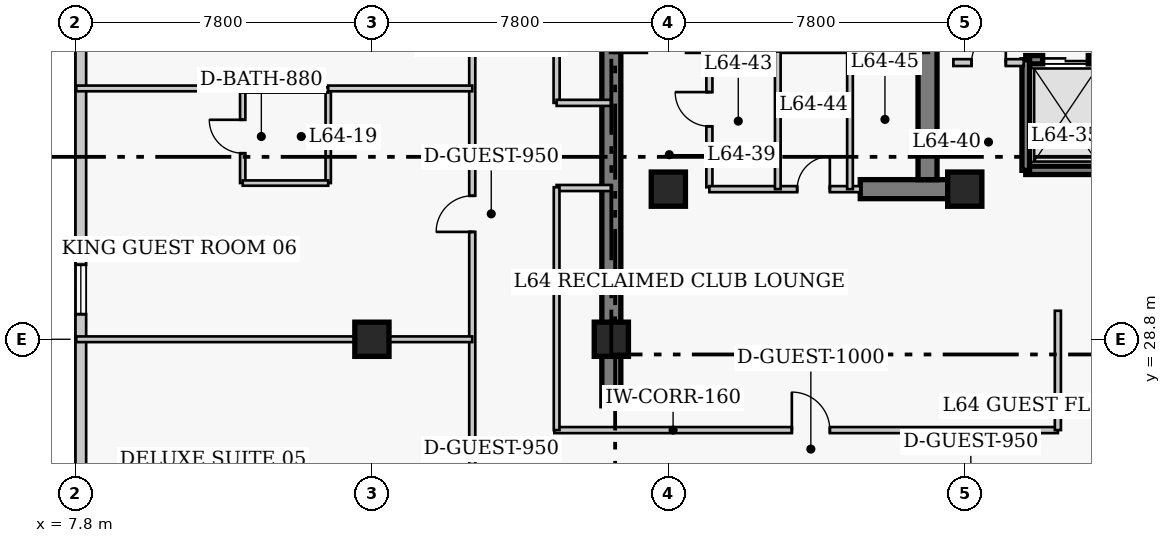
"""IFC4 building model, lengths in metres.
Left out: names, types, materials, properties, quantities, classifications, styles, units other than length and angle.
Written with IfcOpenShell. Run it as: python <this file> out.ifc"""

import sys

from ifc_helpers import new_model, si_unit, direction, frame, frame_2d, origin, origin_2d, place, context, subcontext, project, spatial, rectangle, extrude, element, fill, save


model = new_model("IFC4")
c1 = context("Model", 3, precision=1e-05, world=origin(), true_north=direction((0.0, 1.0)))
c2 = subcontext(c1, "Body", "Model", "MODEL_VIEW")
j1 = project(units=[si_unit("LENGTHUNIT", "METRE"), si_unit("PLANEANGLEUNIT", "RADIAN")], contexts=[c1])
p1 = place(None, origin())
s1 = spatial("IfcSite", under=j1, at=p1, CompositionType="ELEMENT")
p2 = place(p1, origin())
s2 = spatial("IfcBuilding", under=s1, at=p2, CompositionType="ELEMENT")
p3 = place(p2, frame((0.0, 0.0, 257.4)))
s3 = spatial("IfcBuildingStorey", under=s2, at=p3, CompositionType="ELEMENT", Elevation=257.4)
p4 = place(p3, frame((21.9, 27.05, 0.0), z_axis=(0.0, 0.0, 1.0), x_axis=(0.0, 1.0, 0.0)))
e1 = element("IfcWall", 1, at=p4, inside=s3, PredefinedType="SHEAR", context=c2, shape_type="SweptSolid", body=[
    extrude(rectangle(XDim=13.52, YDim=0.5, at=frame_2d((6.76, 0.0))), origin(), (0.0, 0.0, 1.0), 4.0),
])
p5 = place(p3, frame((28.45, 32.75, 0.0), z_axis=(0.0, 0.0, 1.0), x_axis=(1.0, 0.0, 0.0)))
e2 = element("IfcWall", 2, at=p5, inside=s3, PredefinedType="SHEAR", context=c2, shape_type="SweptSolid", body=[
    extrude(rectangle(XDim=2.4, YDim=0.5, at=frame_2d((1.2, 0.0))), origin(), (0.0, 0.0, 1.0), 4.0),
])
p6 = place(p3, frame((30.22, 33.0, 0.0), z_axis=(0.0, 0.0, 1.0), x_axis=(0.0, 1.0, 0.0)))
e3 = element("IfcWall", 3, at=p6, inside=s3, PredefinedType="SHEAR", context=c2, shape_type="SweptSolid", body=[
    extrude(rectangle(XDim=7.32, YDim=0.5, at=frame_2d((3.66, 0.0))), origin(), (0.0, 0.0, 1.0), 4.0),
])
for number, where, z_axis, x_axis in (
    (4, (15.6, 28.8, 0.0), (0.0, 0.0, 1.0), (1.0, 0.0, 0.0)),
    (5, (21.9, 28.8, 0.0), (0.0, 0.0, 1.0), (1.0, 0.0, 0.0)),
    (6, (23.4, 32.75, 0.0), (0.0, 0.0, 1.0), (1.0, 0.0, 0.0)),
    (7, (31.2, 32.75, 0.0), (0.0, 0.0, 1.0), (1.0, 0.0, 0.0)),
):
    element("IfcColumn", number, at=place(p3, frame(where, z_axis=z_axis, x_axis=x_axis)), inside=s3, PredefinedType="COLUMN", context=c2, shape_type="SweptSolid", body=[
        extrude(rectangle(XDim=0.9, YDim=0.9, at=origin_2d()), origin(), (0.0, 0.0, 1.0), 4.0),
    ])
p7 = place(p3, frame((7.94, 41.04, 0.0), z_axis=(0.0, 0.0, 1.0), x_axis=(0.0, -1.0, 0.0)))
e8 = element("IfcWall", 8, at=p7, inside=s3, PredefinedType="SOLIDWALL", context=c2, shape_type="SweptSolid", body=[
    extrude(rectangle(XDim=30.88, YDim=0.28, at=frame_2d((15.44, 0.0))), origin(), (0.0, 0.0, 1.0), 3.76),
])
p8 = place(p7, frame((3.21, 0.0, 0.85)))
e9 = element("IfcOpeningElement", 9, at=p8, cuts=e8, PredefinedType="OPENING", context=c2, shape_type="SweptSolid", body=[
    extrude(rectangle(XDim=1.3, YDim=1.7, at=frame_2d((0.65, 0.85))), frame((0.0, 0.15, 0.0), z_axis=(0.0, -1.0, 0.0), x_axis=(1.0, 0.0, 0.0)), (0.0, 0.0, 1.0), 0.3),
])
p9 = place(p7, frame((10.28, 0.0, 0.85)))
e10 = element("IfcOpeningElement", 10, at=p9, cuts=e8, PredefinedType="OPENING", context=c2, shape_type="SweptSolid", body=[
    extrude(rectangle(XDim=1.3, YDim=1.7, at=frame_2d((0.65, 0.85))), frame((0.0, 0.15, 0.0), z_axis=(0.0, -1.0, 0.0), x_axis=(1.0, 0.0, 0.0)), (0.0, 0.0, 1.0), 0.3),
])
p10 = place(p7, frame((18.65, 0.0, 0.85)))
e11 = element("IfcOpeningElement", 11, at=p10, cuts=e8, PredefinedType="OPENING", context=c2, shape_type="SweptSolid", body=[
    extrude(rectangle(XDim=1.3, YDim=1.7, at=frame_2d((0.65, 0.85))), frame((0.0, 0.15, 0.0), z_axis=(0.0, -1.0, 0.0), x_axis=(1.0, 0.0, 0.0)), (0.0, 0.0, 1.0), 0.3),
])
p11 = place(p7, frame((26.37, 0.0, 0.85)))
e12 = element("IfcOpeningElement", 12, at=p11, cuts=e8, PredefinedType="OPENING", context=c2, shape_type="SweptSolid", body=[
    extrude(rectangle(XDim=1.3, YDim=1.7, at=frame_2d((0.65, 0.85))), frame((0.0, 0.15, 0.0), z_axis=(0.0, -1.0, 0.0), x_axis=(1.0, 0.0, 0.0)), (0.0, 0.0, 1.0), 0.3),
])
p12 = place(p3, frame((32.805, 36.155, 0.0), z_axis=(0.0, 0.0, 1.0), x_axis=(1.0, 0.0, 0.0)))
e13 = element("IfcWall", 13, at=p12, inside=s3, PredefinedType="SHEAR", context=c2, shape_type="SweptSolid", body=[
    extrude(rectangle(XDim=2.09, YDim=0.22, at=frame_2d((1.045, 0.0))), origin(), (0.0, 0.0, 1.0), 4.0),
])
p13 = place(p12, frame((0.445, 0.0, 0.0)))
e14 = element("IfcOpeningElement", 14, at=p13, cuts=e13, PredefinedType="OPENING", context=c2, shape_type="SweptSolid", body=[
    extrude(rectangle(XDim=1.2, YDim=2.15, at=frame_2d((0.6, 1.075))), frame((0.0, 0.12, 0.0), z_axis=(0.0, -1.0, 0.0), x_axis=(1.0, 0.0, 0.0)), (0.0, 0.0, 1.0), 0.24),
])
p14 = place(p3, frame((32.805, 33.245, 0.0), z_axis=(0.0, 0.0, 1.0), x_axis=(1.0, 0.0, 0.0)))
e15 = element("IfcWall", 15, at=p14, inside=s3, PredefinedType="SHEAR", context=c2, shape_type="SweptSolid", body=[
    extrude(rectangle(XDim=2.09, YDim=0.22, at=frame_2d((1.045, 0.0))), origin(), (0.0, 0.0, 1.0), 4.0),
])
p15 = place(p3, frame((32.805, 33.245, 0.0), z_axis=(0.0, 0.0, 1.0), x_axis=(0.0, 1.0, 0.0)))
e16 = element("IfcWall", 16, at=p15, inside=s3, PredefinedType="SHEAR", context=c2, shape_type="SweptSolid", body=[
    extrude(rectangle(XDim=2.91, YDim=0.2, at=frame_2d((1.455, 0.0))), origin(), (0.0, 0.0, 1.0), 4.0),
])
p16 = place(p3, frame((30.9, 36.08, 0.0), z_axis=(0.0, 0.0, 1.0), x_axis=(1.0, 0.0, 0.0)))
e17 = element("IfcWall", 17, at=p16, inside=s3, PredefinedType="PARTITIONING", context=c2, shape_type="SweptSolid", body=[
    extrude(rectangle(XDim=1.85, YDim=0.18, at=frame_2d((0.925, 0.0))), origin(), (0.0, 0.0, 1.0), 3.76),
])
p17 = place(p16, frame((0.48, 0.0, 0.0)))
e18 = element("IfcOpeningElement", 18, at=p17, cuts=e17, PredefinedType="OPENING", context=c2, shape_type="SweptSolid", body=[
    extrude(rectangle(XDim=0.9, YDim=2.15, at=frame_2d((0.45, 1.075))), frame((0.0, 0.1, 0.0), z_axis=(0.0, -1.0, 0.0), x_axis=(1.0, 0.0, 0.0)), (0.0, 0.0, 1.0), 0.2),
])
p18 = place(p3, frame((24.48, 32.8, 0.0), z_axis=(0.0, 0.0, 1.0), x_axis=(0.0, 1.0, 0.0)))
e19 = element("IfcWall", 19, at=p18, inside=s3, PredefinedType="PARTITIONING", context=c2, shape_type="SweptSolid", body=[
    extrude(rectangle(XDim=3.57, YDim=0.16, at=frame_2d((1.785, 0.0))), origin(), (0.0, 0.0, 1.0), 3.76),
])
p19 = place(p18, frame((1.604, 0.0, 0.0)))
e20 = element("IfcOpeningElement", 20, at=p19, cuts=e19, PredefinedType="OPENING", context=c2, shape_type="SweptSolid", body=[
    extrude(rectangle(XDim=0.9, YDim=2.1, at=frame_2d((0.45, 1.05))), frame((0.0, 0.09, 0.0), z_axis=(0.0, -1.0, 0.0), x_axis=(1.0, 0.0, 0.0)), (0.0, 0.0, 1.0), 0.18),
])
p20 = place(p3, frame((24.48, 32.75, 0.0), z_axis=(0.0, 0.0, 1.0), x_axis=(1.0, 0.0, 0.0)))
e21 = element("IfcWall", 21, at=p20, inside=s3, PredefinedType="PARTITIONING", context=c2, shape_type="SweptSolid", body=[
    extrude(rectangle(XDim=3.97, YDim=0.16, at=frame_2d((1.985, 0.0))), origin(), (0.0, 0.0, 1.0), 3.76),
])
p21 = place(p20, frame((2.31, 0.0, 0.0)))
e22 = element("IfcOpeningElement", 22, at=p21, cuts=e21, PredefinedType="OPENING", context=c2, shape_type="SweptSolid", body=[
    extrude(rectangle(XDim=0.86, YDim=2.05, at=frame_2d((0.43, 1.025))), frame((0.0, 0.09, 0.0), z_axis=(0.0, -1.0, 0.0), x_axis=(1.0, 0.0, 0.0)), (0.0, 0.0, 1.0), 0.18),
])
for number, where, z_axis, x_axis in (
    (23, (26.28, 32.75, 0.0), (0.0, 0.0, 1.0), (0.0, 1.0, 0.0)),
    (24, (28.18, 32.75, 0.0), (0.0, 0.0, 1.0), (0.0, 1.0, 0.0)),
):
    element("IfcWall", number, at=place(p3, frame(where, z_axis=z_axis, x_axis=x_axis)), inside=s3, PredefinedType="PARTITIONING", context=c2, shape_type="SweptSolid", body=[
        extrude(rectangle(XDim=3.62, YDim=0.15, at=frame_2d((1.81, 0.0))), origin(), (0.0, 0.0, 1.0), 3.76),
    ])
p22 = place(p3, frame((20.4, 26.41, 0.0), z_axis=(0.0, 0.0, 1.0), x_axis=(1.0, 0.0, 0.0)))
e25 = element("IfcWall", 25, at=p22, inside=s3, PredefinedType="PARTITIONING", context=c2, shape_type="SweptSolid", body=[
    extrude(rectangle(XDim=13.25, YDim=0.16, at=frame_2d((6.625, 0.0))), origin(), (0.0, 0.0, 1.0), 3.76),
])
p23 = place(p22, frame((6.25, 0.0, 0.0)))
e26 = element("IfcOpeningElement", 26, at=p23, cuts=e25, PredefinedType="OPENING", context=c2, shape_type="SweptSolid", body=[
    extrude(rectangle(XDim=1.0, YDim=2.15, at=frame_2d((0.5, 1.075))), frame((0.0, 0.09, 0.0), z_axis=(0.0, -1.0, 0.0), x_axis=(1.0, 0.0, 0.0)), (0.0, 0.0, 1.0), 0.18),
])
p24 = place(p3, frame((33.65, 26.41, 0.0), z_axis=(0.0, 0.0, 1.0), x_axis=(0.0, 1.0, 0.0)))
e27 = element("IfcWall", 27, at=p24, inside=s3, PredefinedType="PARTITIONING", context=c2, shape_type="SweptSolid", body=[
    extrude(rectangle(XDim=3.14, YDim=0.16, at=frame_2d((1.57, 0.0))), origin(), (0.0, 0.0, 1.0), 3.76),
])
p25 = place(p3, frame((18.24, 8.55, 0.0), z_axis=(0.0, 0.0, 1.0), x_axis=(0.0, 1.0, 0.0)))
e28 = element("IfcWall", 28, at=p25, inside=s3, PredefinedType="PARTITIONING", context=c2, shape_type="SweptSolid", body=[
    extrude(rectangle(XDim=32.1, YDim=0.16, at=frame_2d((16.05, 0.0))), origin(), (0.0, 0.0, 1.0), 3.76),
])
p26 = place(p25, frame((5.25, 0.0, 0.0)))
e29 = element("IfcOpeningElement", 29, at=p26, cuts=e28, PredefinedType="OPENING", context=c2, shape_type="SweptSolid", body=[
    extrude(rectangle(XDim=0.95, YDim=2.1, at=frame_2d((0.475, 1.05))), frame((0.0, 0.09, 0.0), z_axis=(0.0, -1.0, 0.0), x_axis=(1.0, 0.0, 0.0)), (0.0, 0.0, 1.0), 0.18),
])
p27 = place(p25, frame((15.375, 0.0, 0.0)))
e30 = element("IfcOpeningElement", 30, at=p27, cuts=e28, PredefinedType="OPENING", context=c2, shape_type="SweptSolid", body=[
    extrude(rectangle(XDim=0.95, YDim=2.1, at=frame_2d((0.475, 1.05))), frame((0.0, 0.09, 0.0), z_axis=(0.0, -1.0, 0.0), x_axis=(1.0, 0.0, 0.0)), (0.0, 0.0, 1.0), 0.18),
])
p28 = place(p25, frame((23.075, 0.0, 0.0)))
e31 = element("IfcOpeningElement", 31, at=p28, cuts=e28, PredefinedType="OPENING", context=c2, shape_type="SweptSolid", body=[
    extrude(rectangle(XDim=0.95, YDim=2.1, at=frame_2d((0.475, 1.05))), frame((0.0, 0.09, 0.0), z_axis=(0.0, -1.0, 0.0), x_axis=(1.0, 0.0, 0.0)), (0.0, 0.0, 1.0), 0.18),
])
p29 = place(p25, frame((29.03, 0.0, 0.0)))
e32 = element("IfcOpeningElement", 32, at=p29, cuts=e28, PredefinedType="OPENING", context=c2, shape_type="SweptSolid", body=[
    extrude(rectangle(XDim=1.0, YDim=2.15, at=frame_2d((0.5, 1.075))), frame((0.0, 0.09, 0.0), z_axis=(0.0, -1.0, 0.0), x_axis=(1.0, 0.0, 0.0)), (0.0, 0.0, 1.0), 0.18),
])
p30 = place(p3, frame((20.46, 35.02, 0.0), z_axis=(0.0, 0.0, 1.0), x_axis=(0.0, 1.0, 0.0)))
e33 = element("IfcWall", 33, at=p30, inside=s3, PredefinedType="PARTITIONING", context=c2, shape_type="SweptSolid", body=[
    extrude(rectangle(XDim=5.63, YDim=0.16, at=frame_2d((2.815, 0.0))), origin(), (0.0, 0.0, 1.0), 3.76),
])
for number, where, z_axis, x_axis in (
    (34, (20.46, 35.02, 0.0), (0.0, 0.0, 1.0), (1.0, 0.0, 0.0)),
    (35, (20.46, 32.78, 0.0), (0.0, 0.0, 1.0), (1.0, 0.0, 0.0)),
):
    element("IfcWall", number, at=place(p3, frame(where, z_axis=z_axis, x_axis=x_axis)), inside=s3, PredefinedType="PARTITIONING", context=c2, shape_type="SweptSolid", body=[
        extrude(rectangle(XDim=1.44, YDim=0.16, at=frame_2d((0.72, 0.0))), origin(), (0.0, 0.0, 1.0), 3.76),
    ])
p31 = place(p3, frame((20.46, 26.41, 0.0), z_axis=(0.0, 0.0, 1.0), x_axis=(0.0, 1.0, 0.0)))
e36 = element("IfcWall", 36, at=p31, inside=s3, PredefinedType="PARTITIONING", context=c2, shape_type="SweptSolid", body=[
    extrude(rectangle(XDim=6.39, YDim=0.15, at=frame_2d((3.195, 0.0))), origin(), (0.0, 0.0, 1.0), 3.76),
])
p32 = place(p3, frame((7.82, 28.8, 0.0), z_axis=(0.0, 0.0, 1.0), x_axis=(1.0, 0.0, 0.0)))
e37 = element("IfcWall", 37, at=p32, inside=s3, PredefinedType="PARTITIONING", context=c2, shape_type="SweptSolid", body=[
    extrude(rectangle(XDim=10.42, YDim=0.15, at=frame_2d((5.21, 0.0))), origin(), (0.0, 0.0, 1.0), 3.064),
])
p33 = place(p3, frame((12.2, 32.91, 0.0), z_axis=(0.0, 0.0, 1.0), x_axis=(0.0, 1.0, 0.0)))
e38 = element("IfcWall", 38, at=p33, inside=s3, PredefinedType="PLUMBINGWALL", context=c2, shape_type="SweptSolid", body=[
    extrude(rectangle(XDim=2.45, YDim=0.14, at=frame_2d((1.225, 0.0))), origin(), (0.0, 0.0, 1.0), 3.76),
])
p34 = place(p33, frame((0.785, 0.0, 0.0)))
e39 = element("IfcOpeningElement", 39, at=p34, cuts=e38, PredefinedType="OPENING", context=c2, shape_type="SweptSolid", body=[
    extrude(rectangle(XDim=0.88, YDim=2.05, at=frame_2d((0.44, 1.025))), frame((0.0, 0.08, 0.0), z_axis=(0.0, -1.0, 0.0), x_axis=(1.0, 0.0, 0.0)), (0.0, 0.0, 1.0), 0.16),
])
p35 = place(p3, frame((14.45, 32.91, 0.0), z_axis=(0.0, 0.0, 1.0), x_axis=(0.0, 1.0, 0.0)))
e40 = element("IfcWall", 40, at=p35, inside=s3, PredefinedType="PLUMBINGWALL", context=c2, shape_type="SweptSolid", body=[
    extrude(rectangle(XDim=2.45, YDim=0.14, at=frame_2d((1.225, 0.0))), origin(), (0.0, 0.0, 1.0), 3.76),
])
for number, where, z_axis, x_axis in (
    (41, (12.2, 32.91, 0.0), (0.0, 0.0, 1.0), (1.0, 0.0, 0.0)),
    (42, (12.2, 35.36, 0.0), (0.0, 0.0, 1.0), (1.0, 0.0, 0.0)),
):
    element("IfcWall", number, at=place(p3, frame(where, z_axis=z_axis, x_axis=x_axis)), inside=s3, PredefinedType="PLUMBINGWALL", context=c2, shape_type="SweptSolid", body=[
        extrude(rectangle(XDim=2.25, YDim=0.14, at=frame_2d((1.125, 0.0))), origin(), (0.0, 0.0, 1.0), 3.76),
    ])
p36 = place(p3, frame((7.82, 35.4, 0.0), z_axis=(0.0, 0.0, 1.0), x_axis=(1.0, 0.0, 0.0)))
e43 = element("IfcWall", 43, at=p36, inside=s3, PredefinedType="PARTITIONING", context=c2, shape_type="SweptSolid", body=[
    extrude(rectangle(XDim=4.38, YDim=0.15, at=frame_2d((2.19, 0.0))), origin(), (0.0, 0.0, 1.0), 3.76),
])
p37 = place(p3, frame((14.45, 35.4, 0.0), z_axis=(0.0, 0.0, 1.0), x_axis=(1.0, 0.0, 0.0)))
e44 = element("IfcWall", 44, at=p37, inside=s3, PredefinedType="PARTITIONING", context=c2, shape_type="SweptSolid", body=[
    extrude(rectangle(XDim=3.79, YDim=0.15, at=frame_2d((1.895, 0.0))), origin(), (0.0, 0.0, 1.0), 3.76),
])
p38 = place(p9, origin())
e45 = element("IfcWindow", 45, at=p38, inside=s3, PartitioningType="SINGLE_PANEL", PredefinedType="WINDOW", context=c2, shape_type="SweptSolid", body=[
    extrude(rectangle(XDim=1.3, YDim=1.7, at=frame_2d((0.65, 0.85))), frame((0.0, 0.03, 0.0), z_axis=(0.0, -1.0, 0.0), x_axis=(1.0, 0.0, 0.0)), (0.0, 0.0, 1.0), 0.06),
])
fill(e10, e45)
p39 = place(p13, origin())
e46 = element("IfcDoor", 46, at=p39, inside=s3, OperationType="DOUBLE_DOOR_SLIDING", PredefinedType="DOOR", context=c2, shape_type="SweptSolid", body=[
    extrude(rectangle(XDim=1.2, YDim=2.15, at=frame_2d((0.6, 1.075))), frame((0.0, 0.025, 0.0), z_axis=(0.0, -1.0, 0.0), x_axis=(1.0, 0.0, 0.0)), (0.0, 0.0, 1.0), 0.05),
])
fill(e14, e46)
p40 = place(p17, origin())
e47 = element("IfcDoor", 47, at=p40, inside=s3, OperationType="SINGLE_SWING_RIGHT", PredefinedType="DOOR", context=c2, shape_type="SweptSolid", body=[
    extrude(rectangle(XDim=0.9, YDim=2.15, at=frame_2d((0.45, 1.075))), frame((0.0, 0.025, 0.0), z_axis=(0.0, -1.0, 0.0), x_axis=(1.0, 0.0, 0.0)), (0.0, 0.0, 1.0), 0.05),
])
fill(e18, e47)
p41 = place(p19, origin())
e48 = element("IfcDoor", 48, at=p41, inside=s3, OperationType="SINGLE_SWING_RIGHT", PredefinedType="DOOR", context=c2, shape_type="SweptSolid", body=[
    extrude(rectangle(XDim=0.9, YDim=2.1, at=frame_2d((0.45, 1.05))), frame((0.0, 0.025, 0.0), z_axis=(0.0, -1.0, 0.0), x_axis=(1.0, 0.0, 0.0)), (0.0, 0.0, 1.0), 0.05),
])
fill(e20, e48)
p42 = place(p21, origin())
e49 = element("IfcDoor", 49, at=p42, inside=s3, OperationType="SINGLE_SWING_RIGHT", PredefinedType="DOOR", context=c2, shape_type="SweptSolid", body=[
    extrude(rectangle(XDim=0.86, YDim=2.05, at=frame_2d((0.43, 1.025))), frame((0.0, 0.025, 0.0), z_axis=(0.0, -1.0, 0.0), x_axis=(1.0, 0.0, 0.0)), (0.0, 0.0, 1.0), 0.05),
])
fill(e22, e49)
p43 = place(p23, origin())
e50 = element("IfcDoor", 50, at=p43, inside=s3, OperationType="SINGLE_SWING_LEFT", PredefinedType="DOOR", context=c2, shape_type="SweptSolid", body=[
    extrude(rectangle(XDim=1.0, YDim=2.15, at=frame_2d((0.5, 1.075))), frame((0.0, 0.025, 0.0), z_axis=(0.0, -1.0, 0.0), x_axis=(1.0, 0.0, 0.0)), (0.0, 0.0, 1.0), 0.05),
])
fill(e26, e50)
p44 = place(p34, origin())
e51 = element("IfcDoor", 51, at=p44, inside=s3, OperationType="SINGLE_SWING_RIGHT", PredefinedType="DOOR", context=c2, shape_type="SweptSolid", body=[
    extrude(rectangle(XDim=0.88, YDim=2.05, at=frame_2d((0.44, 1.025))), frame((0.0, 0.025, 0.0), z_axis=(0.0, -1.0, 0.0), x_axis=(1.0, 0.0, 0.0)), (0.0, 0.0, 1.0), 0.05),
])
fill(e39, e51)
p45 = place(p28, origin())
e52 = element("IfcDoor", 52, at=p45, inside=s3, OperationType="SINGLE_SWING_LEFT", PredefinedType="DOOR", context=c2, shape_type="SweptSolid", body=[
    extrude(rectangle(XDim=0.95, YDim=2.1, at=frame_2d((0.475, 1.05))), frame((0.0, 0.025, 0.0), z_axis=(0.0, -1.0, 0.0), x_axis=(1.0, 0.0, 0.0)), (0.0, 0.0, 1.0), 0.05),
])
fill(e31, e52)
save(model, sys.argv[1])
